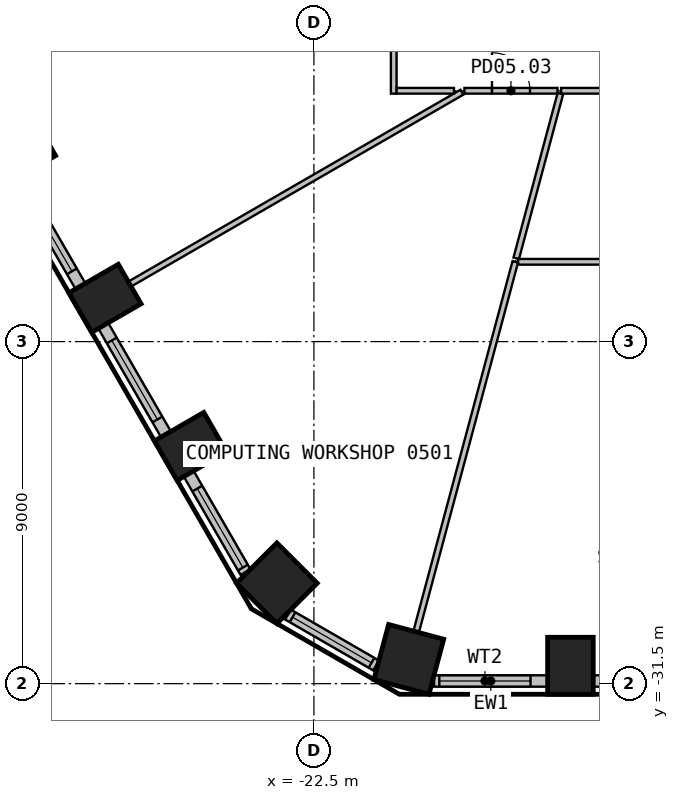
"""IFC4 building model, lengths in metres.
Left out: names, types, materials, properties, quantities, classifications, styles, units other than length and angle.
Written with IfcOpenShell. Run it as: python <this file> out.ifc"""

import sys

from ifc_helpers import new_model, si_unit, direction, frame, frame_2d, origin, origin_2d, place, context, subcontext, project, spatial, rectangle, extrude, element, fill, save


model = new_model("IFC4")
c1 = context("Model", 3, precision=1e-05, world=origin(), true_north=direction((0.0, 1.0)))
c2 = subcontext(c1, "Body", "Model", "MODEL_VIEW")
j1 = project(units=[si_unit("LENGTHUNIT", "METRE"), si_unit("PLANEANGLEUNIT", "RADIAN")], contexts=[c1])
p1 = place(None, origin())
s1 = spatial("IfcSite", under=j1, at=p1, CompositionType="ELEMENT")
p2 = place(p1, origin())
s2 = spatial("IfcBuilding", under=s1, at=p2, CompositionType="ELEMENT")
p3 = place(p2, frame((0.0, 0.0, 25.2)))
s3 = spatial("IfcBuildingStorey", under=s2, at=p3, CompositionType="ELEMENT", Elevation=25.2)
p4 = place(p3, frame((-20.004, -30.861, 0.0), z_axis=(0.0, 0.0, 1.0), x_axis=(0.965925826289, -0.258819045103, 0.0)))
e1 = element("IfcColumn", 1, at=p4, inside=s3, PredefinedType="COLUMN", context=c2, shape_type="SweptSolid", body=[
    extrude(rectangle(XDim=1.5, YDim=1.5, at=origin_2d()), origin(), (0.0, 0.0, 1.0), 4.425),
])
for number, where, z_axis, x_axis in (
    (2, (-15.75, -31.03, 0.0), (0.0, 0.0, 1.0), (1.0, 0.0, 0.0)),
    (3, (-30.248, -17.463, 0.0), (0.0, 0.0, 1.0), (0.5, -0.866, 0.0)),
    (4, (-27.998, -21.361, 0.0), (0.0, 0.0, 1.0), (0.5, -0.866, 0.0)),
    (5, (-25.748, -25.258, 0.0), (0.0, 0.0, 1.0), (0.5, -0.866, 0.0)),
):
    element("IfcColumn", number, at=place(p3, frame(where, z_axis=z_axis, x_axis=x_axis)), inside=s3, PredefinedType="COLUMN", context=c2, shape_type="SweptSolid", body=[
        extrude(rectangle(XDim=1.2, YDim=1.5, at=origin_2d()), origin(), (0.0, 0.0, 1.0), 4.425),
    ])
p5 = place(p3, frame((-23.475, -28.857, 0.0), z_axis=(0.0, 0.0, 1.0), x_axis=(0.707106781187, -0.707106781187, 0.0)))
e6 = element("IfcColumn", 6, at=p5, inside=s3, PredefinedType="COLUMN", context=c2, shape_type="SweptSolid", body=[
    extrude(rectangle(XDim=1.5, YDim=1.5, at=origin_2d()), origin(), (0.0, 0.0, 1.0), 4.425),
])
p6 = place(p3, frame((-19.339, -31.43, 0.0), z_axis=(0.0, 0.0, 1.0), x_axis=(1.0, 0.0, 0.0)))
e7 = element("IfcWall", 7, at=p6, inside=s3, PredefinedType="SOLIDWALL", context=c2, shape_type="SweptSolid", body=[
    extrude(rectangle(XDim=2.989, YDim=0.3, at=frame_2d((1.494, 0.0))), origin(), (0.0, 0.0, 1.0), 4.425),
])
p7 = place(p6, frame((0.139, 0.0, 0.9)))
e8 = element("IfcOpeningElement", 8, at=p7, cuts=e7, PredefinedType="OPENING", context=c2, shape_type="SweptSolid", body=[
    extrude(rectangle(XDim=2.4, YDim=3.0, at=frame_2d((1.2, 1.5))), frame((0.0, 0.16, 0.0), z_axis=(0.0, -1.0, 0.0), x_axis=(1.0, 0.0, 0.0)), (0.0, 0.0, 1.0), 0.32),
])
p8 = place(p3, frame((-15.149, -31.43, 0.0), z_axis=(0.0, 0.0, 1.0), x_axis=(1.0, 0.0, 0.0)))
e9 = element("IfcWall", 9, at=p8, inside=s3, PredefinedType="SOLIDWALL", context=c2, shape_type="SweptSolid", body=[
    extrude(rectangle(XDim=3.299, YDim=0.3, at=frame_2d((1.649, 0.0))), origin(), (0.0, 0.0, 1.0), 4.425),
])
p9 = place(p8, frame((0.449, 0.0, 0.9)))
e10 = element("IfcOpeningElement", 10, at=p9, cuts=e9, PredefinedType="OPENING", context=c2, shape_type="SweptSolid", body=[
    extrude(rectangle(XDim=2.4, YDim=3.0, at=frame_2d((1.2, 1.5))), frame((0.0, 0.16, 0.0), z_axis=(0.0, -1.0, 0.0), x_axis=(1.0, 0.0, 0.0)), (0.0, 0.0, 1.0), 0.32),
])
p10 = place(p3, frame((-30.294, -18.184, 0.0), z_axis=(0.0, 0.0, 1.0), x_axis=(0.499991515992, -0.866030301974, 0.0)))
e11 = element("IfcWall", 11, at=p10, inside=s3, PredefinedType="SOLIDWALL", context=c2, shape_type="SweptSolid", body=[
    extrude(rectangle(XDim=3.299, YDim=0.3, at=frame_2d((1.649, 0.0))), origin(), (0.0, 0.0, 1.0), 4.425),
])
p11 = place(p10, frame((0.449, 0.0, 0.9)))
e12 = element("IfcOpeningElement", 12, at=p11, cuts=e11, PredefinedType="OPENING", context=c2, shape_type="SweptSolid", body=[
    extrude(rectangle(XDim=2.4, YDim=3.0, at=frame_2d((1.2, 1.5))), frame((0.0, 0.16, 0.0), z_axis=(0.0, -1.0, 0.0), x_axis=(1.0, 0.0, 0.0)), (0.0, 0.0, 1.0), 0.32),
])
p12 = place(p3, frame((-28.044, -22.081, 0.0), z_axis=(0.0, 0.0, 1.0), x_axis=(0.499991515992, -0.866030301974, 0.0)))
e13 = element("IfcWall", 13, at=p12, inside=s3, PredefinedType="SOLIDWALL", context=c2, shape_type="SweptSolid", body=[
    extrude(rectangle(XDim=3.299, YDim=0.3, at=frame_2d((1.649, 0.0))), origin(), (0.0, 0.0, 1.0), 4.425),
])
p13 = place(p12, frame((0.449, 0.0, 0.9)))
e14 = element("IfcOpeningElement", 14, at=p13, cuts=e13, PredefinedType="OPENING", context=c2, shape_type="SweptSolid", body=[
    extrude(rectangle(XDim=2.4, YDim=3.0, at=frame_2d((1.2, 1.5))), frame((0.0, 0.16, 0.0), z_axis=(0.0, -1.0, 0.0), x_axis=(1.0, 0.0, 0.0)), (0.0, 0.0, 1.0), 0.32),
])
p14 = place(p3, frame((-25.794, -25.978, 0.0), z_axis=(0.0, 0.0, 1.0), x_axis=(0.49999586137, -0.866027793211, 0.0)))
e15 = element("IfcWall", 15, at=p14, inside=s3, PredefinedType="SOLIDWALL", context=c2, shape_type="SweptSolid", body=[
    extrude(rectangle(XDim=2.989, YDim=0.3, at=frame_2d((1.494, 0.0))), origin(), (0.0, 0.0, 1.0), 4.425),
])
p15 = place(p14, frame((0.449, 0.0, 0.9)))
e16 = element("IfcOpeningElement", 16, at=p15, cuts=e15, PredefinedType="OPENING", context=c2, shape_type="SweptSolid", body=[
    extrude(rectangle(XDim=2.4, YDim=3.0, at=frame_2d((1.2, 1.5))), frame((0.0, 0.16, 0.0), z_axis=(0.0, -1.0, 0.0), x_axis=(1.0, 0.0, 0.0)), (0.0, 0.0, 1.0), 0.32),
])
p16 = place(p3, frame((-23.183, -29.682, 0.0), z_axis=(0.0, 0.0, 1.0), x_axis=(0.866001915448, -0.500040680786, 0.0)))
e17 = element("IfcWall", 17, at=p16, inside=s3, PredefinedType="SOLIDWALL", context=c2, shape_type="SweptSolid", body=[
    extrude(rectangle(XDim=2.678, YDim=0.3, at=frame_2d((1.339, 0.0))), origin(), (0.0, 0.0, 1.0), 4.425),
])
p17 = place(p16, frame((0.139, 0.0, 0.9)))
e18 = element("IfcOpeningElement", 18, at=p17, cuts=e17, PredefinedType="OPENING", context=c2, shape_type="SweptSolid", body=[
    extrude(rectangle(XDim=2.4, YDim=3.0, at=frame_2d((1.2, 1.5))), frame((0.0, 0.16, 0.0), z_axis=(0.0, -1.0, 0.0), x_axis=(1.0, 0.0, 0.0)), (0.0, 0.0, 1.0), 0.32),
])
p18 = place(p3, frame((-18.605, -15.938, 0.0), z_axis=(0.0, 0.0, 1.0), x_axis=(-0.865988664976, -0.500063628085, 0.0)))
e19 = element("IfcWall", 19, at=p18, inside=s3, PredefinedType="PARTITIONING", context=c2, shape_type="SweptSolid", body=[
    extrude(rectangle(XDim=10.076, YDim=0.15, at=frame_2d((5.038, 0.0))), origin(), (0.0, 0.0, 1.0), 4.425),
])
p19 = place(p3, frame((-20.4, 2.974, 0.0), z_axis=(0.0, 0.0, 1.0), x_axis=(0.0, -1.0, 0.0)))
e20 = element("IfcWall", 20, at=p19, inside=s3, PredefinedType="PARTITIONING", context=c2, shape_type="SweptSolid", body=[
    extrude(rectangle(XDim=18.949, YDim=0.15, at=frame_2d((9.475, 0.0))), origin(), (0.0, 0.0, 1.0), 4.425),
])
p20 = place(p19, frame((8.975, 0.0, 0.0)))
e21 = element("IfcOpeningElement", 21, at=p20, cuts=e20, PredefinedType="OPENING", context=c2, shape_type="SweptSolid", body=[
    extrude(rectangle(XDim=1.0, YDim=2.1, at=frame_2d((0.5, 1.05))), frame((0.0, 0.085, 0.0), z_axis=(0.0, -1.0, 0.0), x_axis=(1.0, 0.0, 0.0)), (0.0, 0.0, 1.0), 0.17),
])
p21 = place(p3, frame((-20.325, -15.9, 0.0), z_axis=(0.0, 0.0, 1.0), x_axis=(1.0, 0.0, 0.0)))
e22 = element("IfcWall", 22, at=p21, inside=s3, PredefinedType="PARTITIONING", context=c2, shape_type="SweptSolid", body=[
    extrude(rectangle(XDim=1.51, YDim=0.15, at=frame_2d((0.755, 0.0))), origin(), (0.0, 0.0, 1.0), 4.425),
])
p22 = place(p3, frame((-17.201, -20.4, 0.0), z_axis=(0.0, 0.0, 1.0), x_axis=(-0.258837572796, -0.965920861618, 0.0)))
e23 = element("IfcWall", 23, at=p22, inside=s3, PredefinedType="PARTITIONING", context=c2, shape_type="SweptSolid", body=[
    extrude(rectangle(XDim=10.06, YDim=0.15, at=frame_2d((5.03, 0.0))), origin(), (0.0, 0.0, 1.0), 4.425),
])
p23 = place(p3, frame((-18.54, -15.9, 0.0), z_axis=(0.0, 0.0, 1.0), x_axis=(1.0, 0.0, 0.0)))
e24 = element("IfcWall", 24, at=p23, inside=s3, PredefinedType="PARTITIONING", context=c2, shape_type="SweptSolid", body=[
    extrude(rectangle(XDim=2.45, YDim=0.15, at=frame_2d((1.225, 0.0))), origin(), (0.0, 0.0, 1.0), 4.425),
])
p24 = place(p23, frame((0.725, 0.0, 0.0)))
e25 = element("IfcOpeningElement", 25, at=p24, cuts=e24, PredefinedType="OPENING", context=c2, shape_type="SweptSolid", body=[
    extrude(rectangle(XDim=1.0, YDim=2.1, at=frame_2d((0.5, 1.05))), frame((0.0, 0.085, 0.0), z_axis=(0.0, -1.0, 0.0), x_axis=(1.0, 0.0, 0.0)), (0.0, 0.0, 1.0), 0.17),
])
p25 = place(p3, frame((-16.014, -15.972, 0.0), z_axis=(0.0, 0.0, 1.0), x_axis=(-0.258894670978, -0.965905559224, 0.0)))
e26 = element("IfcWall", 26, at=p25, inside=s3, PredefinedType="PARTITIONING", context=c2, shape_type="SweptSolid", body=[
    extrude(rectangle(XDim=4.489, YDim=0.15, at=frame_2d((2.244, 0.0))), origin(), (0.0, 0.0, 1.0), 4.425),
])
p26 = place(p3, frame((-17.126, -20.4, 0.0), z_axis=(0.0, 0.0, 1.0), x_axis=(1.0, 0.0, 0.0)))
e27 = element("IfcWall", 27, at=p26, inside=s3, PredefinedType="PARTITIONING", context=c2, shape_type="SweptSolid", body=[
    extrude(rectangle(XDim=14.801, YDim=0.15, at=frame_2d((7.4, 0.0))), origin(), (0.0, 0.0, 1.0), 4.425),
])
p27 = place(p3, frame((-15.995, -15.9, 0.0), z_axis=(0.0, 0.0, 1.0), x_axis=(1.0, 0.0, 0.0)))
e28 = element("IfcWall", 28, at=p27, inside=s3, PredefinedType="PARTITIONING", context=c2, shape_type="SweptSolid", body=[
    extrude(rectangle(XDim=13.82, YDim=0.15, at=frame_2d((6.91, 0.0))), origin(), (0.0, 0.0, 1.0), 4.425),
])
p28 = place(p27, frame((6.41, 0.0, 0.0)))
e29 = element("IfcOpeningElement", 29, at=p28, cuts=e28, PredefinedType="OPENING", context=c2, shape_type="SweptSolid", body=[
    extrude(rectangle(XDim=1.0, YDim=2.1, at=frame_2d((0.5, 1.05))), frame((0.0, 0.085, 0.0), z_axis=(0.0, -1.0, 0.0), x_axis=(1.0, 0.0, 0.0)), (0.0, 0.0, 1.0), 0.17),
])
p29 = place(p7, origin())
e30 = element("IfcWindow", 30, at=p29, inside=s3, PartitioningType="SINGLE_PANEL", PredefinedType="WINDOW", context=c2, shape_type="SweptSolid", body=[
    extrude(rectangle(XDim=2.4, YDim=3.0, at=frame_2d((1.2, 1.5))), frame((0.0, 0.03, 0.0), z_axis=(0.0, -1.0, 0.0), x_axis=(1.0, 0.0, 0.0)), (0.0, 0.0, 1.0), 0.06),
])
fill(e8, e30)
p30 = place(p11, origin())
e31 = element("IfcWindow", 31, at=p30, inside=s3, PartitioningType="SINGLE_PANEL", PredefinedType="WINDOW", context=c2, shape_type="SweptSolid", body=[
    extrude(rectangle(XDim=2.4, YDim=3.0, at=frame_2d((1.2, 1.5))), frame((0.0, 0.03, 0.0), z_axis=(0.0, -1.0, 0.0), x_axis=(1.0, 0.0, 0.0)), (0.0, 0.0, 1.0), 0.06),
])
fill(e12, e31)
p31 = place(p13, origin())
e32 = element("IfcWindow", 32, at=p31, inside=s3, PartitioningType="SINGLE_PANEL", PredefinedType="WINDOW", context=c2, shape_type="SweptSolid", body=[
    extrude(rectangle(XDim=2.4, YDim=3.0, at=frame_2d((1.2, 1.5))), frame((0.0, 0.03, 0.0), z_axis=(0.0, -1.0, 0.0), x_axis=(1.0, 0.0, 0.0)), (0.0, 0.0, 1.0), 0.06),
])
fill(e14, e32)
p32 = place(p15, origin())
e33 = element("IfcWindow", 33, at=p32, inside=s3, PartitioningType="SINGLE_PANEL", PredefinedType="WINDOW", context=c2, shape_type="SweptSolid", body=[
    extrude(rectangle(XDim=2.4, YDim=3.0, at=frame_2d((1.2, 1.5))), frame((0.0, 0.03, 0.0), z_axis=(0.0, -1.0, 0.0), x_axis=(1.0, 0.0, 0.0)), (0.0, 0.0, 1.0), 0.06),
])
fill(e16, e33)
p33 = place(p17, origin())
e34 = element("IfcWindow", 34, at=p33, inside=s3, PartitioningType="SINGLE_PANEL", PredefinedType="WINDOW", context=c2, shape_type="SweptSolid", body=[
    extrude(rectangle(XDim=2.4, YDim=3.0, at=frame_2d((1.2, 1.5))), frame((0.0, 0.03, 0.0), z_axis=(0.0, -1.0, 0.0), x_axis=(1.0, 0.0, 0.0)), (0.0, 0.0, 1.0), 0.06),
])
fill(e18, e34)
p34 = place(p24, origin())
e35 = element("IfcDoor", 35, at=p34, inside=s3, OperationType="SINGLE_SWING_LEFT", PredefinedType="DOOR", context=c2, shape_type="SweptSolid", body=[
    extrude(rectangle(XDim=1.0, YDim=2.1, at=frame_2d((0.5, 1.05))), frame((0.0, 0.025, 0.0), z_axis=(0.0, -1.0, 0.0), x_axis=(1.0, 0.0, 0.0)), (0.0, 0.0, 1.0), 0.05),
])
fill(e25, e35)
save(model, sys.argv[1])
